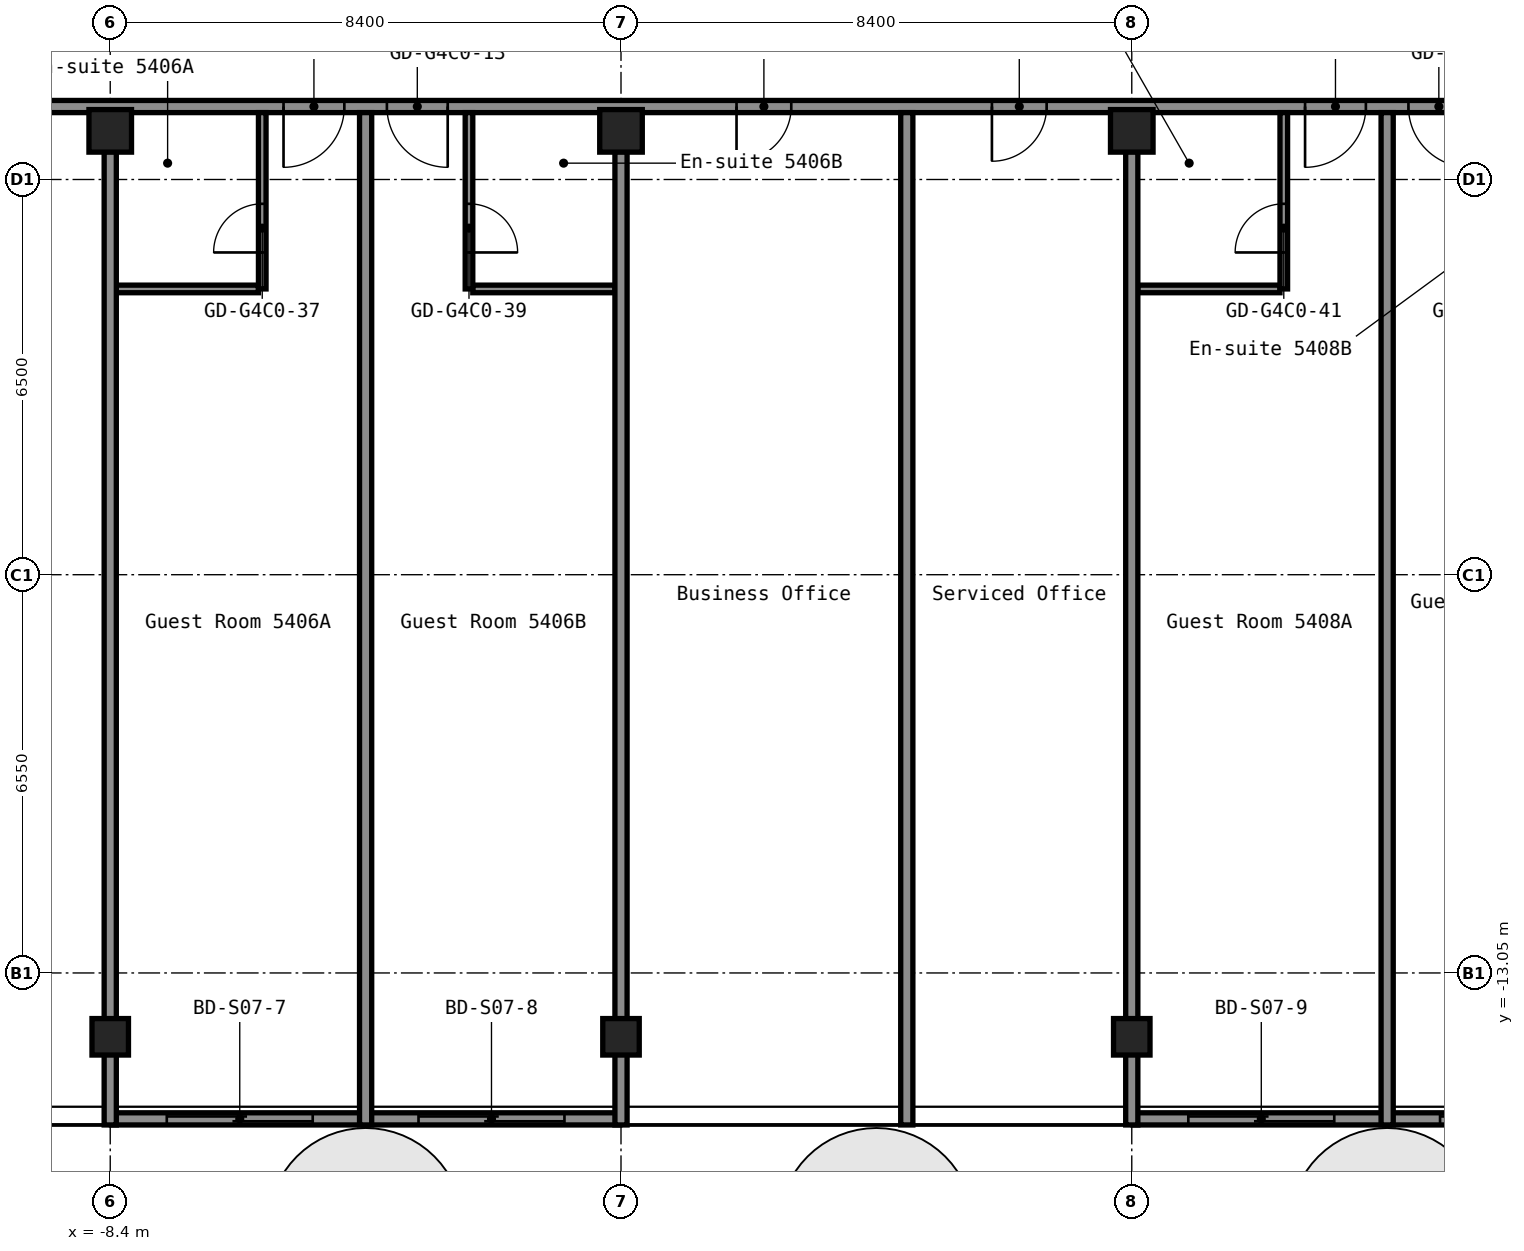
"""IFC4 building model, lengths in metres.
Left out: names, types, materials, properties, quantities, classifications, styles, units other than length and angle.
Written with IfcOpenShell. Run it as: python <this file> out.ifc"""

import sys

from ifc_helpers import new_model, si_unit, direction, frame, frame_2d, origin, origin_2d, place, context, subcontext, project, spatial, rectangle, hollow_rectangle, extrude, element, fill, save


model = new_model("IFC4")
c1 = context("Model", 3, precision=1e-05, world=origin(), true_north=direction((0.0, 1.0)))
c2 = subcontext(c1, "Body", "Model", "MODEL_VIEW")
j1 = project(units=[si_unit("LENGTHUNIT", "METRE"), si_unit("PLANEANGLEUNIT", "RADIAN")], contexts=[c1])
p1 = place(None, origin())
s1 = spatial("IfcSite", under=j1, at=p1, CompositionType="ELEMENT")
p2 = place(p1, origin())
s2 = spatial("IfcBuilding", under=s1, at=p2, CompositionType="ELEMENT")
p3 = place(p2, frame((0.0, 0.0, 193.0)))
s3 = spatial("IfcBuildingStorey", under=s2, at=p3, CompositionType="ELEMENT", Elevation=193.0)
p4 = place(p3, frame((-8.4, -14.1, 0.0), z_axis=(0.0, 0.0, 1.0), x_axis=(1.0, 0.0, 0.0)))
e1 = element("IfcColumn", 1, at=p4, inside=s3, PredefinedType="COLUMN", context=c2, shape_type="SweptSolid", body=[
    extrude(hollow_rectangle(XDim=0.6, YDim=0.6, WallThickness=0.025, InnerFilletRadius=0.038, OuterFilletRadius=0.062, at=origin_2d()), origin(), (0.0, 0.0, 1.0), 2.75),
])
p5 = place(p3, frame((-8.4, 0.8, 0.0), z_axis=(0.0, 0.0, 1.0), x_axis=(1.0, 0.0, 0.0)))
e2 = element("IfcColumn", 2, at=p5, inside=s3, PredefinedType="COLUMN", context=c2, shape_type="SweptSolid", body=[
    extrude(hollow_rectangle(XDim=0.7, YDim=0.7, WallThickness=0.028, at=origin_2d()), origin(), (0.0, 0.0, 1.0), 2.75),
])
p6 = place(p3, frame((0.0, -14.1, 0.0), z_axis=(0.0, 0.0, 1.0), x_axis=(1.0, 0.0, 0.0)))
e3 = element("IfcColumn", 3, at=p6, inside=s3, PredefinedType="COLUMN", context=c2, shape_type="SweptSolid", body=[
    extrude(hollow_rectangle(XDim=0.6, YDim=0.6, WallThickness=0.025, InnerFilletRadius=0.038, OuterFilletRadius=0.062, at=origin_2d()), origin(), (0.0, 0.0, 1.0), 2.75),
])
p7 = place(p3, frame((0.0, 0.8, 0.0), z_axis=(0.0, 0.0, 1.0), x_axis=(1.0, 0.0, 0.0)))
e4 = element("IfcColumn", 4, at=p7, inside=s3, PredefinedType="COLUMN", context=c2, shape_type="SweptSolid", body=[
    extrude(hollow_rectangle(XDim=0.7, YDim=0.7, WallThickness=0.028, at=origin_2d()), origin(), (0.0, 0.0, 1.0), 2.75),
])
p8 = place(p3, frame((8.4, -14.1, 0.0), z_axis=(0.0, 0.0, 1.0), x_axis=(1.0, 0.0, 0.0)))
e5 = element("IfcColumn", 5, at=p8, inside=s3, PredefinedType="COLUMN", context=c2, shape_type="SweptSolid", body=[
    extrude(hollow_rectangle(XDim=0.6, YDim=0.6, WallThickness=0.025, InnerFilletRadius=0.038, OuterFilletRadius=0.062, at=origin_2d()), origin(), (0.0, 0.0, 1.0), 2.75),
])
p9 = place(p3, frame((8.4, 0.8, 0.0), z_axis=(0.0, 0.0, 1.0), x_axis=(1.0, 0.0, 0.0)))
e6 = element("IfcColumn", 6, at=p9, inside=s3, PredefinedType="COLUMN", context=c2, shape_type="SweptSolid", body=[
    extrude(hollow_rectangle(XDim=0.7, YDim=0.7, WallThickness=0.028, at=origin_2d()), origin(), (0.0, 0.0, 1.0), 2.75),
])
p10 = place(p3, frame((-8.3, -1.8, 0.0), z_axis=(0.0, 0.0, 1.0), x_axis=(1.0, 0.0, 0.0)))
e7 = element("IfcWall", 7, at=p10, inside=s3, PredefinedType="PARTITIONING", context=c2, shape_type="SweptSolid", body=[
    extrude(rectangle(XDim=2.338, YDim=0.125, at=frame_2d((1.169, 0.0))), origin(), (0.0, 0.0, 1.0), 2.75),
])
for number, where, z_axis, x_axis in (
    (8, (-2.438, -1.8, 0.0), (0.0, 0.0, 1.0), (1.0, 0.0, 0.0)),
    (9, (8.5, -1.8, 0.0), (0.0, 0.0, 1.0), (1.0, 0.0, 0.0)),
):
    element("IfcWall", number, at=place(p3, frame(where, z_axis=z_axis, x_axis=x_axis)), inside=s3, PredefinedType="PARTITIONING", context=c2, shape_type="SweptSolid", body=[
        extrude(rectangle(XDim=2.337, YDim=0.125, at=frame_2d((1.169, 0.0))), origin(), (0.0, 0.0, 1.0), 2.75),
    ])
p11 = place(p3, frame((-16.8, 1.2, 0.0), z_axis=(0.0, 0.0, 1.0), x_axis=(1.0, 0.0, 0.0)))
e10 = element("IfcWall", 10, at=p11, inside=s3, PredefinedType="PARTITIONING", context=c2, shape_type="SweptSolid", body=[
    extrude(rectangle(XDim=33.6, YDim=0.2, at=frame_2d((16.8, 0.0))), origin(), (0.0, 0.0, 1.0), 2.75),
])
p12 = place(p11, frame((5.4, 0.0, 0.0)))
e11 = element("IfcOpeningElement", 11, at=p12, cuts=e10, PredefinedType="OPENING", context=c2, shape_type="SweptSolid", body=[
    extrude(rectangle(XDim=1.0, YDim=2.1, at=frame_2d((0.5, 1.05))), frame((0.0, 0.11, 0.0), z_axis=(0.0, -1.0, 0.0), x_axis=(1.0, 0.0, 0.0)), (0.0, 0.0, 1.0), 0.22),
])
p13 = place(p11, frame((11.25, 0.0, 0.0)))
e12 = element("IfcOpeningElement", 12, at=p13, cuts=e10, PredefinedType="OPENING", context=c2, shape_type="SweptSolid", body=[
    extrude(rectangle(XDim=1.0, YDim=2.1, at=frame_2d((0.5, 1.05))), frame((0.0, 0.11, 0.0), z_axis=(0.0, -1.0, 0.0), x_axis=(1.0, 0.0, 0.0)), (0.0, 0.0, 1.0), 0.22),
])
p14 = place(p11, frame((12.95, 0.0, 0.0)))
e13 = element("IfcOpeningElement", 13, at=p14, cuts=e10, PredefinedType="OPENING", context=c2, shape_type="SweptSolid", body=[
    extrude(rectangle(XDim=1.0, YDim=2.1, at=frame_2d((0.5, 1.05))), frame((0.0, 0.11, 0.0), z_axis=(0.0, -1.0, 0.0), x_axis=(1.0, 0.0, 0.0)), (0.0, 0.0, 1.0), 0.22),
])
p15 = place(p11, frame((18.7, 0.0, 0.0)))
e14 = element("IfcOpeningElement", 14, at=p15, cuts=e10, PredefinedType="OPENING", context=c2, shape_type="SweptSolid", body=[
    extrude(rectangle(XDim=0.9, YDim=2.1, at=frame_2d((0.45, 1.05))), frame((0.0, 0.11, 0.0), z_axis=(0.0, -1.0, 0.0), x_axis=(1.0, 0.0, 0.0)), (0.0, 0.0, 1.0), 0.22),
])
p16 = place(p11, frame((22.9, 0.0, 0.0)))
e15 = element("IfcOpeningElement", 15, at=p16, cuts=e10, PredefinedType="OPENING", context=c2, shape_type="SweptSolid", body=[
    extrude(rectangle(XDim=0.9, YDim=2.1, at=frame_2d((0.45, 1.05))), frame((0.0, 0.11, 0.0), z_axis=(0.0, -1.0, 0.0), x_axis=(1.0, 0.0, 0.0)), (0.0, 0.0, 1.0), 0.22),
])
p17 = place(p11, frame((28.05, 0.0, 0.0)))
e16 = element("IfcOpeningElement", 16, at=p17, cuts=e10, PredefinedType="OPENING", context=c2, shape_type="SweptSolid", body=[
    extrude(rectangle(XDim=1.0, YDim=2.1, at=frame_2d((0.5, 1.05))), frame((0.0, 0.11, 0.0), z_axis=(0.0, -1.0, 0.0), x_axis=(1.0, 0.0, 0.0)), (0.0, 0.0, 1.0), 0.22),
])
p18 = place(p11, frame((29.75, 0.0, 0.0)))
e17 = element("IfcOpeningElement", 17, at=p18, cuts=e10, PredefinedType="OPENING", context=c2, shape_type="SweptSolid", body=[
    extrude(rectangle(XDim=1.0, YDim=2.1, at=frame_2d((0.5, 1.05))), frame((0.0, 0.11, 0.0), z_axis=(0.0, -1.0, 0.0), x_axis=(1.0, 0.0, 0.0)), (0.0, 0.0, 1.0), 0.22),
])
p19 = place(p3, frame((-8.4, -15.55, 0.0), z_axis=(0.0, 0.0, 1.0), x_axis=(0.0, 1.0, 0.0)))
e18 = element("IfcWall", 18, at=p19, inside=s3, PredefinedType="PARTITIONING", context=c2, shape_type="SweptSolid", body=[
    extrude(rectangle(XDim=16.01, YDim=0.2, at=frame_2d((8.005, 0.0))), origin(), (0.0, 0.0, 1.0), 2.75),
])
p20 = place(p3, frame((-5.9, -1.8, 0.0), z_axis=(0.0, 0.0, 1.0), x_axis=(0.0, 1.0, 0.0)))
e19 = element("IfcWall", 19, at=p20, inside=s3, PredefinedType="PARTITIONING", context=c2, shape_type="SweptSolid", body=[
    extrude(rectangle(XDim=2.9, YDim=0.125, at=frame_2d((1.45, 0.0))), origin(), (0.0, 0.0, 1.0), 2.75),
])
p21 = place(p20, frame((0.6, 0.0, 0.0)))
e20 = element("IfcOpeningElement", 20, at=p21, cuts=e19, PredefinedType="OPENING", context=c2, shape_type="SweptSolid", body=[
    extrude(rectangle(XDim=0.8, YDim=2.1, at=frame_2d((0.4, 1.05))), frame((0.0, 0.073, 0.0), z_axis=(0.0, -1.0, 0.0), x_axis=(1.0, 0.0, 0.0)), (0.0, 0.0, 1.0), 0.145),
])
p22 = place(p3, frame((-4.2, -15.55, 0.0), z_axis=(0.0, 0.0, 1.0), x_axis=(0.0, 1.0, 0.0)))
e21 = element("IfcWall", 21, at=p22, inside=s3, PredefinedType="PARTITIONING", context=c2, shape_type="SweptSolid", body=[
    extrude(rectangle(XDim=16.65, YDim=0.2, at=frame_2d((8.325, 0.0))), origin(), (0.0, 0.0, 1.0), 2.75),
])
p23 = place(p3, frame((-2.5, -1.8, 0.0), z_axis=(0.0, 0.0, 1.0), x_axis=(0.0, 1.0, 0.0)))
e22 = element("IfcWall", 22, at=p23, inside=s3, PredefinedType="PARTITIONING", context=c2, shape_type="SweptSolid", body=[
    extrude(rectangle(XDim=2.9, YDim=0.125, at=frame_2d((1.45, 0.0))), origin(), (0.0, 0.0, 1.0), 2.75),
])
p24 = place(p23, frame((0.6, 0.0, 0.0)))
e23 = element("IfcOpeningElement", 23, at=p24, cuts=e22, PredefinedType="OPENING", context=c2, shape_type="SweptSolid", body=[
    extrude(rectangle(XDim=0.8, YDim=2.1, at=frame_2d((0.4, 1.05))), frame((0.0, 0.073, 0.0), z_axis=(0.0, -1.0, 0.0), x_axis=(1.0, 0.0, 0.0)), (0.0, 0.0, 1.0), 0.145),
])
p25 = place(p3, frame((0.0, -15.55, 0.0), z_axis=(0.0, 0.0, 1.0), x_axis=(0.0, 1.0, 0.0)))
e24 = element("IfcWall", 24, at=p25, inside=s3, PredefinedType="PARTITIONING", context=c2, shape_type="SweptSolid", body=[
    extrude(rectangle(XDim=16.01, YDim=0.2, at=frame_2d((8.005, 0.0))), origin(), (0.0, 0.0, 1.0), 2.75),
])
p26 = place(p3, frame((4.7, -15.55, 0.0), z_axis=(0.0, 0.0, 1.0), x_axis=(0.0, 1.0, 0.0)))
e25 = element("IfcWall", 25, at=p26, inside=s3, PredefinedType="PARTITIONING", context=c2, shape_type="SweptSolid", body=[
    extrude(rectangle(XDim=16.65, YDim=0.2, at=frame_2d((8.325, 0.0))), origin(), (0.0, 0.0, 1.0), 2.75),
])
p27 = place(p3, frame((8.4, -15.55, 0.0), z_axis=(0.0, 0.0, 1.0), x_axis=(0.0, 1.0, 0.0)))
e26 = element("IfcWall", 26, at=p27, inside=s3, PredefinedType="PARTITIONING", context=c2, shape_type="SweptSolid", body=[
    extrude(rectangle(XDim=16.01, YDim=0.2, at=frame_2d((8.005, 0.0))), origin(), (0.0, 0.0, 1.0), 2.75),
])
p28 = place(p3, frame((10.9, -1.8, 0.0), z_axis=(0.0, 0.0, 1.0), x_axis=(0.0, 1.0, 0.0)))
e27 = element("IfcWall", 27, at=p28, inside=s3, PredefinedType="PARTITIONING", context=c2, shape_type="SweptSolid", body=[
    extrude(rectangle(XDim=2.9, YDim=0.125, at=frame_2d((1.45, 0.0))), origin(), (0.0, 0.0, 1.0), 2.75),
])
p29 = place(p28, frame((0.6, 0.0, 0.0)))
e28 = element("IfcOpeningElement", 28, at=p29, cuts=e27, PredefinedType="OPENING", context=c2, shape_type="SweptSolid", body=[
    extrude(rectangle(XDim=0.8, YDim=2.1, at=frame_2d((0.4, 1.05))), frame((0.0, 0.073, 0.0), z_axis=(0.0, -1.0, 0.0), x_axis=(1.0, 0.0, 0.0)), (0.0, 0.0, 1.0), 0.145),
])
p30 = place(p3, frame((12.6, -15.55, 0.0), z_axis=(0.0, 0.0, 1.0), x_axis=(0.0, 1.0, 0.0)))
e29 = element("IfcWall", 29, at=p30, inside=s3, PredefinedType="PARTITIONING", context=c2, shape_type="SweptSolid", body=[
    extrude(rectangle(XDim=16.65, YDim=0.2, at=frame_2d((8.325, 0.0))), origin(), (0.0, 0.0, 1.0), 2.75),
])
p31 = place(p3, frame((-8.38, -15.45, 0.0), z_axis=(0.0, 0.0, 1.0), x_axis=(1.0, 0.0, 0.0)))
p32 = place(p31, frame((0.91, 0.0, 0.0)))
p33 = place(p32, frame((2.4, 0.0, 0.0), z_axis=(0.0, 0.0, 1.0), x_axis=(-1.0, 0.0, 0.0)))
e30 = element("IfcDoor", 30, at=p33, inside=s3, OperationType="SLIDING_TO_LEFT", PredefinedType="DOOR", context=c2, shape_type="SweptSolid", body=[
    extrude(rectangle(XDim=2.4, YDim=2.2, at=frame_2d((1.2, 1.1))), frame((0.0, 0.025, 0.0), z_axis=(0.0, -1.0, 0.0), x_axis=(1.0, 0.0, 0.0)), (0.0, 0.0, 1.0), 0.05),
])
p34 = place(p3, frame((-4.24, -15.45, 0.0), z_axis=(0.0, 0.0, 1.0), x_axis=(1.0, 0.0, 0.0)))
p35 = place(p34, frame((0.91, 0.0, 0.0)))
p36 = place(p35, frame((2.4, 0.0, 0.0), z_axis=(0.0, 0.0, 1.0), x_axis=(-1.0, 0.0, 0.0)))
e31 = element("IfcDoor", 31, at=p36, inside=s3, OperationType="SLIDING_TO_LEFT", PredefinedType="DOOR", context=c2, shape_type="SweptSolid", body=[
    extrude(rectangle(XDim=2.4, YDim=2.2, at=frame_2d((1.2, 1.1))), frame((0.0, 0.025, 0.0), z_axis=(0.0, -1.0, 0.0), x_axis=(1.0, 0.0, 0.0)), (0.0, 0.0, 1.0), 0.05),
])
p37 = place(p3, frame((8.42, -15.45, 0.0), z_axis=(0.0, 0.0, 1.0), x_axis=(1.0, 0.0, 0.0)))
p38 = place(p37, frame((0.91, 0.0, 0.0)))
p39 = place(p38, frame((2.4, 0.0, 0.0), z_axis=(0.0, 0.0, 1.0), x_axis=(-1.0, 0.0, 0.0)))
e32 = element("IfcDoor", 32, at=p39, inside=s3, OperationType="SLIDING_TO_LEFT", PredefinedType="DOOR", context=c2, shape_type="SweptSolid", body=[
    extrude(rectangle(XDim=2.4, YDim=2.2, at=frame_2d((1.2, 1.1))), frame((0.0, 0.025, 0.0), z_axis=(0.0, -1.0, 0.0), x_axis=(1.0, 0.0, 0.0)), (0.0, 0.0, 1.0), 0.05),
])
p40 = place(p3, frame((12.56, -15.45, 0.0), z_axis=(0.0, 0.0, 1.0), x_axis=(1.0, 0.0, 0.0)))
p41 = place(p40, frame((0.91, 0.0, 0.0)))
p42 = place(p41, frame((2.4, 0.0, 0.0), z_axis=(0.0, 0.0, 1.0), x_axis=(-1.0, 0.0, 0.0)))
e33 = element("IfcDoor", 33, at=p42, inside=s3, OperationType="SLIDING_TO_LEFT", PredefinedType="DOOR", context=c2, shape_type="SweptSolid", body=[
    extrude(rectangle(XDim=2.4, YDim=2.2, at=frame_2d((1.2, 1.1))), frame((0.0, 0.025, 0.0), z_axis=(0.0, -1.0, 0.0), x_axis=(1.0, 0.0, 0.0)), (0.0, 0.0, 1.0), 0.05),
])
p43 = place(p13, origin())
e34 = element("IfcDoor", 34, at=p43, inside=s3, OperationType="SINGLE_SWING_LEFT", PredefinedType="DOOR", context=c2, shape_type="SweptSolid", body=[
    extrude(rectangle(XDim=1.0, YDim=2.1, at=frame_2d((0.5, 1.05))), frame((0.0, 0.025, 0.0), z_axis=(0.0, -1.0, 0.0), x_axis=(1.0, 0.0, 0.0)), (0.0, 0.0, 1.0), 0.05),
])
fill(e12, e34)
p44 = place(p14, origin())
e35 = element("IfcDoor", 35, at=p44, inside=s3, OperationType="SINGLE_SWING_RIGHT", PredefinedType="DOOR", context=c2, shape_type="SweptSolid", body=[
    extrude(rectangle(XDim=1.0, YDim=2.1, at=frame_2d((0.5, 1.05))), frame((0.0, 0.025, 0.0), z_axis=(0.0, -1.0, 0.0), x_axis=(1.0, 0.0, 0.0)), (0.0, 0.0, 1.0), 0.05),
])
fill(e13, e35)
p45 = place(p15, origin())
e36 = element("IfcDoor", 36, at=p45, inside=s3, OperationType="SINGLE_SWING_LEFT", PredefinedType="DOOR", context=c2, shape_type="SweptSolid", body=[
    extrude(rectangle(XDim=0.9, YDim=2.1, at=frame_2d((0.45, 1.05))), frame((0.0, 0.025, 0.0), z_axis=(0.0, -1.0, 0.0), x_axis=(1.0, 0.0, 0.0)), (0.0, 0.0, 1.0), 0.05),
])
fill(e14, e36)
p46 = place(p16, origin())
e37 = element("IfcDoor", 37, at=p46, inside=s3, OperationType="SINGLE_SWING_LEFT", PredefinedType="DOOR", context=c2, shape_type="SweptSolid", body=[
    extrude(rectangle(XDim=0.9, YDim=2.1, at=frame_2d((0.45, 1.05))), frame((0.0, 0.025, 0.0), z_axis=(0.0, -1.0, 0.0), x_axis=(1.0, 0.0, 0.0)), (0.0, 0.0, 1.0), 0.05),
])
fill(e15, e37)
p47 = place(p17, origin())
e38 = element("IfcDoor", 38, at=p47, inside=s3, OperationType="SINGLE_SWING_LEFT", PredefinedType="DOOR", context=c2, shape_type="SweptSolid", body=[
    extrude(rectangle(XDim=1.0, YDim=2.1, at=frame_2d((0.5, 1.05))), frame((0.0, 0.025, 0.0), z_axis=(0.0, -1.0, 0.0), x_axis=(1.0, 0.0, 0.0)), (0.0, 0.0, 1.0), 0.05),
])
fill(e16, e38)
p48 = place(p18, origin())
e39 = element("IfcDoor", 39, at=p48, inside=s3, OperationType="SINGLE_SWING_RIGHT", PredefinedType="DOOR", context=c2, shape_type="SweptSolid", body=[
    extrude(rectangle(XDim=1.0, YDim=2.1, at=frame_2d((0.5, 1.05))), frame((0.0, 0.025, 0.0), z_axis=(0.0, -1.0, 0.0), x_axis=(1.0, 0.0, 0.0)), (0.0, 0.0, 1.0), 0.05),
])
fill(e17, e39)
p49 = place(p21, origin())
e40 = element("IfcDoor", 40, at=p49, inside=s3, OperationType="SINGLE_SWING_RIGHT", PredefinedType="DOOR", context=c2, shape_type="SweptSolid", body=[
    extrude(rectangle(XDim=0.8, YDim=2.1, at=frame_2d((0.4, 1.05))), frame((0.0, 0.025, 0.0), z_axis=(0.0, -1.0, 0.0), x_axis=(1.0, 0.0, 0.0)), (0.0, 0.0, 1.0), 0.05),
])
fill(e20, e40)
p50 = place(p24, origin())
e41 = element("IfcDoor", 41, at=p50, inside=s3, OperationType="SINGLE_SWING_LEFT", PredefinedType="DOOR", context=c2, shape_type="SweptSolid", body=[
    extrude(rectangle(XDim=0.8, YDim=2.1, at=frame_2d((0.4, 1.05))), frame((0.0, 0.025, 0.0), z_axis=(0.0, -1.0, 0.0), x_axis=(1.0, 0.0, 0.0)), (0.0, 0.0, 1.0), 0.05),
])
fill(e23, e41)
p51 = place(p29, origin())
e42 = element("IfcDoor", 42, at=p51, inside=s3, OperationType="SINGLE_SWING_RIGHT", PredefinedType="DOOR", context=c2, shape_type="SweptSolid", body=[
    extrude(rectangle(XDim=0.8, YDim=2.1, at=frame_2d((0.4, 1.05))), frame((0.0, 0.025, 0.0), z_axis=(0.0, -1.0, 0.0), x_axis=(1.0, 0.0, 0.0)), (0.0, 0.0, 1.0), 0.05),
])
fill(e28, e42)
save(model, sys.argv[1])
